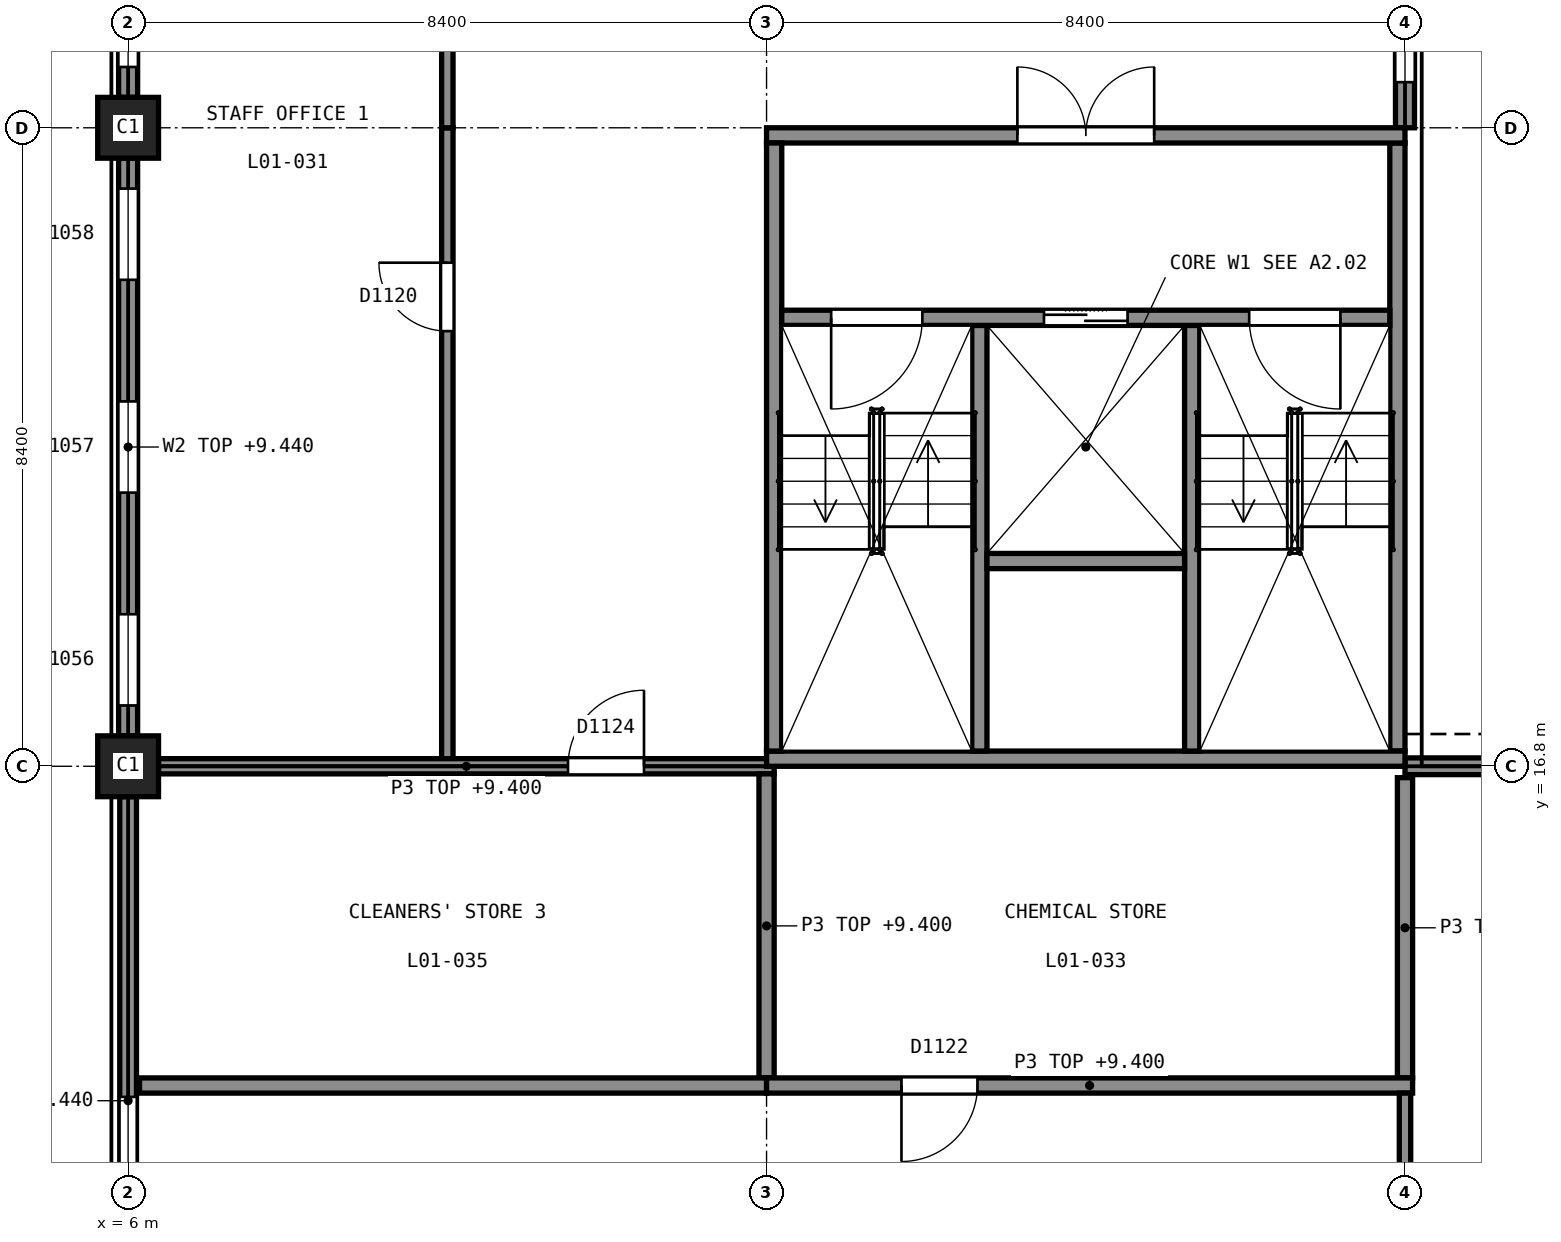
"""IFC4 building model, lengths in metres.
Left out: names, types, materials, properties, quantities, classifications, styles, units other than length and angle.
Written with IfcOpenShell. Run it as: python <this file> out.ifc"""

import sys

from ifc_helpers import new_model, si_unit, direction, frame, frame_2d, origin, origin_2d, place, context, subcontext, project, spatial, rectangle, extrude, element, fill, save


model = new_model("IFC4")
c1 = context("Model", 3, precision=1e-05, world=origin(), true_north=direction((0.0, 1.0)))
c2 = subcontext(c1, "Body", "Model", "MODEL_VIEW")
j1 = project(units=[si_unit("LENGTHUNIT", "METRE"), si_unit("PLANEANGLEUNIT", "RADIAN")], contexts=[c1])
p1 = place(None, origin())
s1 = spatial("IfcSite", under=j1, at=p1, CompositionType="ELEMENT")
p2 = place(p1, origin())
s2 = spatial("IfcBuilding", under=s1, at=p2, CompositionType="ELEMENT")
p3 = place(p2, frame((0.0, 0.0, 5.5)))
s3 = spatial("IfcBuildingStorey", under=s2, at=p3, CompositionType="ELEMENT", Elevation=5.5)
p4 = place(p3, frame((14.4, 16.9, 0.0), z_axis=(0.0, 0.0, 1.0), x_axis=(1.0, 0.0, 0.0)))
e1 = element("IfcWall", 1, at=p4, inside=s3, PredefinedType="SHEAR", context=c2, shape_type="SweptSolid", body=[
    extrude(rectangle(XDim=8.4, YDim=0.2, at=frame_2d((4.2, 0.0))), origin(), (0.0, 0.0, 1.0), 5.0),
])
p5 = place(p3, frame((14.4, 25.1, 0.0), z_axis=(0.0, 0.0, 1.0), x_axis=(1.0, 0.0, 0.0)))
e2 = element("IfcWall", 2, at=p5, inside=s3, PredefinedType="SHEAR", context=c2, shape_type="SweptSolid", body=[
    extrude(rectangle(XDim=8.4, YDim=0.2, at=frame_2d((4.2, 0.0))), origin(), (0.0, 0.0, 1.0), 5.0),
])
p6 = place(p5, frame((3.3, 0.0, 0.0)))
e3 = element("IfcOpeningElement", 3, at=p6, cuts=e2, PredefinedType="OPENING", context=c2, shape_type="SweptSolid", body=[
    extrude(rectangle(XDim=1.8, YDim=2.1, at=frame_2d((0.9, 1.05))), frame((0.0, 0.11, 0.0), z_axis=(0.0, -1.0, 0.0), x_axis=(1.0, 0.0, 0.0)), (0.0, 0.0, 1.0), 0.22),
])
for number, where, z_axis, x_axis in (
    (4, (14.5, 17.0, 0.0), (0.0, 0.0, 1.0), (0.0, 1.0, 0.0)),
    (5, (22.7, 17.0, 0.0), (0.0, 0.0, 1.0), (0.0, 1.0, 0.0)),
):
    element("IfcWall", number, at=place(p3, frame(where, z_axis=z_axis, x_axis=x_axis)), inside=s3, PredefinedType="SHEAR", context=c2, shape_type="SweptSolid", body=[
        extrude(rectangle(XDim=8.0, YDim=0.2, at=frame_2d((4.0, 0.0))), origin(), (0.0, 0.0, 1.0), 5.0),
    ])
p7 = place(p3, frame((14.6, 22.7, 0.0), z_axis=(0.0, 0.0, 1.0), x_axis=(1.0, 0.0, 0.0)))
e6 = element("IfcWall", 6, at=p7, inside=s3, PredefinedType="SHEAR", context=c2, shape_type="SweptSolid", body=[
    extrude(rectangle(XDim=8.0, YDim=0.2, at=frame_2d((4.0, 0.0))), origin(), (0.0, 0.0, 1.0), 5.0),
])
p8 = place(p7, frame((0.65, 0.0, 0.0)))
e7 = element("IfcOpeningElement", 7, at=p8, cuts=e6, PredefinedType="OPENING", context=c2, shape_type="SweptSolid", body=[
    extrude(rectangle(XDim=1.2, YDim=2.1, at=frame_2d((0.6, 1.05))), frame((0.0, 0.11, 0.0), z_axis=(0.0, -1.0, 0.0), x_axis=(1.0, 0.0, 0.0)), (0.0, 0.0, 1.0), 0.22),
])
p9 = place(p7, frame((6.15, 0.0, 0.0)))
e8 = element("IfcOpeningElement", 8, at=p9, cuts=e6, PredefinedType="OPENING", context=c2, shape_type="SweptSolid", body=[
    extrude(rectangle(XDim=1.2, YDim=2.1, at=frame_2d((0.6, 1.05))), frame((0.0, 0.11, 0.0), z_axis=(0.0, -1.0, 0.0), x_axis=(1.0, 0.0, 0.0)), (0.0, 0.0, 1.0), 0.22),
])
p10 = place(p7, frame((3.45, 0.0, 0.0)))
e9 = element("IfcOpeningElement", 9, at=p10, cuts=e6, PredefinedType="OPENING", context=c2, shape_type="SweptSolid", body=[
    extrude(rectangle(XDim=1.1, YDim=2.1, at=frame_2d((0.55, 1.05))), frame((0.0, 0.11, 0.0), z_axis=(0.0, -1.0, 0.0), x_axis=(1.0, 0.0, 0.0)), (0.0, 0.0, 1.0), 0.22),
])
for number, where, z_axis, x_axis in (
    (10, (17.2, 17.0, 0.0), (0.0, 0.0, 1.0), (0.0, 1.0, 0.0)),
    (11, (20.0, 17.0, 0.0), (0.0, 0.0, 1.0), (0.0, 1.0, 0.0)),
):
    element("IfcWall", number, at=place(p3, frame(where, z_axis=z_axis, x_axis=x_axis)), inside=s3, PredefinedType="SHEAR", context=c2, shape_type="SweptSolid", body=[
        extrude(rectangle(XDim=5.6, YDim=0.2, at=frame_2d((2.8, 0.0))), origin(), (0.0, 0.0, 1.0), 5.0),
    ])
p11 = place(p3, frame((17.3, 19.5, 0.0), z_axis=(0.0, 0.0, 1.0), x_axis=(1.0, 0.0, 0.0)))
e12 = element("IfcWall", 12, at=p11, inside=s3, PredefinedType="SHEAR", context=c2, shape_type="SweptSolid", body=[
    extrude(rectangle(XDim=2.6, YDim=0.2, at=frame_2d((1.3, 0.0))), origin(), (0.0, 0.0, 1.0), 5.0),
])
for number, where, z_axis, x_axis in (
    (13, (6.0, 16.8, 0.0), (0.0, 0.0, 1.0), (1.0, 0.0, 0.0)),
    (14, (6.0, 25.2, 0.0), (0.0, 0.0, 1.0), (1.0, 0.0, 0.0)),
):
    element("IfcColumn", number, at=place(p3, frame(where, z_axis=z_axis, x_axis=x_axis)), inside=s3, PredefinedType="COLUMN", context=c2, shape_type="SweptSolid", body=[
        extrude(rectangle(XDim=0.8, YDim=0.8, at=origin_2d()), origin(), (0.0, 0.0, 1.0), 5.0),
    ])
p12 = place(p3, frame((22.8, 16.8, 0.0), z_axis=(0.0, 0.0, 1.0), x_axis=(1.0, 0.0, 0.0)))
e15 = element("IfcWall", 15, at=p12, inside=s3, PredefinedType="SOLIDWALL", context=c2, shape_type="SweptSolid", body=[
    extrude(rectangle(XDim=8.0, YDim=0.22, at=frame_2d((4.0, 0.0))), origin(), (0.0, 0.0, 1.0), 3.94),
])
p13 = place(p12, frame((2.2, 0.0, 0.9)))
e16 = element("IfcOpeningElement", 16, at=p13, cuts=e15, PredefinedType="OPENING", context=c2, shape_type="SweptSolid", body=[
    extrude(rectangle(XDim=3.6, YDim=1.5, at=frame_2d((1.8, 0.75))), frame((0.0, 0.12, 0.0), z_axis=(0.0, -1.0, 0.0), x_axis=(1.0, 0.0, 0.0)), (0.0, 0.0, 1.0), 0.24),
])
p14 = place(p3, frame((22.8, 25.2, 0.0), z_axis=(0.0, 0.0, 1.0), x_axis=(0.0, 1.0, 0.0)))
e17 = element("IfcWall", 17, at=p14, inside=s3, PredefinedType="SOLIDWALL", context=c2, shape_type="SweptSolid", body=[
    extrude(rectangle(XDim=8.0, YDim=0.25, at=frame_2d((4.0, 0.0))), origin(), (0.0, 0.0, 1.0), 3.94),
])
p15 = place(p14, frame((0.6, 0.0, 0.9)))
e18 = element("IfcOpeningElement", 18, at=p15, cuts=e17, PredefinedType="OPENING", context=c2, shape_type="SweptSolid", body=[
    extrude(rectangle(XDim=1.2, YDim=2.1, at=frame_2d((0.6, 1.05))), frame((0.0, 0.135, 0.0), z_axis=(0.0, -1.0, 0.0), x_axis=(1.0, 0.0, 0.0)), (0.0, 0.0, 1.0), 0.27),
])
p16 = place(p14, frame((2.85, 0.0, 0.9)))
e19 = element("IfcOpeningElement", 19, at=p16, cuts=e17, PredefinedType="OPENING", context=c2, shape_type="SweptSolid", body=[
    extrude(rectangle(XDim=1.2, YDim=2.1, at=frame_2d((0.6, 1.05))), frame((0.0, 0.135, 0.0), z_axis=(0.0, -1.0, 0.0), x_axis=(1.0, 0.0, 0.0)), (0.0, 0.0, 1.0), 0.27),
])
p17 = place(p14, frame((6.2, 0.0, 0.9)))
e20 = element("IfcOpeningElement", 20, at=p17, cuts=e17, PredefinedType="OPENING", context=c2, shape_type="SweptSolid", body=[
    extrude(rectangle(XDim=1.2, YDim=2.1, at=frame_2d((0.6, 1.05))), frame((0.0, 0.135, 0.0), z_axis=(0.0, -1.0, 0.0), x_axis=(1.0, 0.0, 0.0)), (0.0, 0.0, 1.0), 0.27),
])
p18 = place(p3, frame((6.0, 25.6, 0.0), z_axis=(0.0, 0.0, 1.0), x_axis=(0.0, 1.0, 0.0)))
e21 = element("IfcWall", 21, at=p18, inside=s3, PredefinedType="SOLIDWALL", context=c2, shape_type="SweptSolid", body=[
    extrude(rectangle(XDim=7.6, YDim=0.25, at=frame_2d((3.8, 0.0))), origin(), (0.0, 0.0, 1.0), 3.94),
])
p19 = place(p18, frame((0.4, 0.0, 0.9)))
e22 = element("IfcOpeningElement", 22, at=p19, cuts=e21, PredefinedType="OPENING", context=c2, shape_type="SweptSolid", body=[
    extrude(rectangle(XDim=1.2, YDim=2.1, at=frame_2d((0.6, 1.05))), frame((0.0, 0.135, 0.0), z_axis=(0.0, -1.0, 0.0), x_axis=(1.0, 0.0, 0.0)), (0.0, 0.0, 1.0), 0.27),
])
p20 = place(p18, frame((3.2, 0.0, 0.9)))
e23 = element("IfcOpeningElement", 23, at=p20, cuts=e21, PredefinedType="OPENING", context=c2, shape_type="SweptSolid", body=[
    extrude(rectangle(XDim=1.2, YDim=2.1, at=frame_2d((0.6, 1.05))), frame((0.0, 0.135, 0.0), z_axis=(0.0, -1.0, 0.0), x_axis=(1.0, 0.0, 0.0)), (0.0, 0.0, 1.0), 0.27),
])
p21 = place(p18, frame((6.0, 0.0, 0.9)))
e24 = element("IfcOpeningElement", 24, at=p21, cuts=e21, PredefinedType="OPENING", context=c2, shape_type="SweptSolid", body=[
    extrude(rectangle(XDim=1.2, YDim=2.1, at=frame_2d((0.6, 1.05))), frame((0.0, 0.135, 0.0), z_axis=(0.0, -1.0, 0.0), x_axis=(1.0, 0.0, 0.0)), (0.0, 0.0, 1.0), 0.27),
])
p22 = place(p3, frame((6.0, 17.2, 0.0), z_axis=(0.0, 0.0, 1.0), x_axis=(0.0, 1.0, 0.0)))
e25 = element("IfcWall", 25, at=p22, inside=s3, PredefinedType="SOLIDWALL", context=c2, shape_type="SweptSolid", body=[
    extrude(rectangle(XDim=7.6, YDim=0.25, at=frame_2d((3.8, 0.0))), origin(), (0.0, 0.0, 1.0), 3.94),
])
p23 = place(p22, frame((0.4, 0.0, 0.9)))
e26 = element("IfcOpeningElement", 26, at=p23, cuts=e25, PredefinedType="OPENING", context=c2, shape_type="SweptSolid", body=[
    extrude(rectangle(XDim=1.2, YDim=2.1, at=frame_2d((0.6, 1.05))), frame((0.0, 0.135, 0.0), z_axis=(0.0, -1.0, 0.0), x_axis=(1.0, 0.0, 0.0)), (0.0, 0.0, 1.0), 0.27),
])
p24 = place(p22, frame((3.2, 0.0, 0.9)))
e27 = element("IfcOpeningElement", 27, at=p24, cuts=e25, PredefinedType="OPENING", context=c2, shape_type="SweptSolid", body=[
    extrude(rectangle(XDim=1.2, YDim=2.1, at=frame_2d((0.6, 1.05))), frame((0.0, 0.135, 0.0), z_axis=(0.0, -1.0, 0.0), x_axis=(1.0, 0.0, 0.0)), (0.0, 0.0, 1.0), 0.27),
])
p25 = place(p22, frame((6.0, 0.0, 0.9)))
e28 = element("IfcOpeningElement", 28, at=p25, cuts=e25, PredefinedType="OPENING", context=c2, shape_type="SweptSolid", body=[
    extrude(rectangle(XDim=1.2, YDim=2.1, at=frame_2d((0.6, 1.05))), frame((0.0, 0.135, 0.0), z_axis=(0.0, -1.0, 0.0), x_axis=(1.0, 0.0, 0.0)), (0.0, 0.0, 1.0), 0.27),
])
p26 = place(p3, frame((6.0, 8.4, 0.0), z_axis=(0.0, 0.0, 1.0), x_axis=(0.0, 1.0, 0.0)))
e29 = element("IfcWall", 29, at=p26, inside=s3, PredefinedType="SOLIDWALL", context=c2, shape_type="SweptSolid", body=[
    extrude(rectangle(XDim=8.0, YDim=0.22, at=frame_2d((4.0, 0.0))), origin(), (0.0, 0.0, 1.0), 3.94),
])
p27 = place(p26, frame((0.45, 0.0, 0.9)))
e30 = element("IfcOpeningElement", 30, at=p27, cuts=e29, PredefinedType="OPENING", context=c2, shape_type="SweptSolid", body=[
    extrude(rectangle(XDim=3.6, YDim=1.5, at=frame_2d((1.8, 0.75))), frame((0.0, 0.12, 0.0), z_axis=(0.0, -1.0, 0.0), x_axis=(1.0, 0.0, 0.0)), (0.0, 0.0, 1.0), 0.24),
])
p28 = place(p3, frame((10.2, 16.9, 0.0), z_axis=(0.0, 0.0, 1.0), x_axis=(0.0, 1.0, 0.0)))
e31 = element("IfcWall", 31, at=p28, inside=s3, PredefinedType="PARTITIONING", context=c2, shape_type="SweptSolid", body=[
    extrude(rectangle(XDim=8.3, YDim=0.15, at=frame_2d((4.15, 0.0))), origin(), (0.0, 0.0, 1.0), 3.9),
])
p29 = place(p28, frame((5.625, 0.0, 0.0)))
e32 = element("IfcOpeningElement", 32, at=p29, cuts=e31, PredefinedType="OPENING", context=c2, shape_type="SweptSolid", body=[
    extrude(rectangle(XDim=0.9, YDim=2.1, at=frame_2d((0.45, 1.05))), frame((0.0, 0.085, 0.0), z_axis=(0.0, -1.0, 0.0), x_axis=(1.0, 0.0, 0.0)), (0.0, 0.0, 1.0), 0.17),
])
p30 = place(p3, frame((10.2, 25.2, 0.0), z_axis=(0.0, 0.0, 1.0), x_axis=(0.0, 1.0, 0.0)))
e33 = element("IfcWall", 33, at=p30, inside=s3, PredefinedType="PARTITIONING", context=c2, shape_type="SweptSolid", body=[
    extrude(rectangle(XDim=8.325, YDim=0.15, at=frame_2d((4.163, 0.0))), origin(), (0.0, 0.0, 1.0), 3.9),
])
p31 = place(p3, frame((6.4, 16.8, 0.0), z_axis=(0.0, 0.0, 1.0), x_axis=(1.0, 0.0, 0.0)))
e34 = element("IfcWall", 34, at=p31, inside=s3, PredefinedType="PARTITIONING", context=c2, shape_type="SweptSolid", body=[
    extrude(rectangle(XDim=8.1, YDim=0.2, at=frame_2d((4.05, 0.0))), origin(), (0.0, 0.0, 1.0), 3.9),
])
p32 = place(p31, frame((5.387, 0.0, 0.0)))
e35 = element("IfcOpeningElement", 35, at=p32, cuts=e34, PredefinedType="OPENING", context=c2, shape_type="SweptSolid", body=[
    extrude(rectangle(XDim=1.0, YDim=2.1, at=frame_2d((0.5, 1.05))), frame((0.0, 0.11, 0.0), z_axis=(0.0, -1.0, 0.0), x_axis=(1.0, 0.0, 0.0)), (0.0, 0.0, 1.0), 0.22),
])
p33 = place(p3, frame((14.4, 12.7, 0.0), z_axis=(0.0, 0.0, 1.0), x_axis=(0.0, 1.0, 0.0)))
e36 = element("IfcWall", 36, at=p33, inside=s3, PredefinedType="PARTITIONING", context=c2, shape_type="SweptSolid", body=[
    extrude(rectangle(XDim=4.0, YDim=0.2, at=frame_2d((2.0, 0.0))), origin(), (0.0, 0.0, 1.0), 3.9),
])
p34 = place(p3, frame((22.8, 12.7, 0.0), z_axis=(0.0, 0.0, 1.0), x_axis=(0.0, 1.0, 0.0)))
e37 = element("IfcWall", 37, at=p34, inside=s3, PredefinedType="PARTITIONING", context=c2, shape_type="SweptSolid", body=[
    extrude(rectangle(XDim=3.95, YDim=0.2, at=frame_2d((1.975, 0.0))), origin(), (0.0, 0.0, 1.0), 3.9),
])
p35 = place(p3, frame((6.15, 12.6, 0.0), z_axis=(0.0, 0.0, 1.0), x_axis=(1.0, 0.0, 0.0)))
e38 = element("IfcWall", 38, at=p35, inside=s3, PredefinedType="PARTITIONING", context=c2, shape_type="SweptSolid", body=[
    extrude(rectangle(XDim=8.25, YDim=0.2, at=frame_2d((4.125, 0.0))), origin(), (0.0, 0.0, 1.0), 3.9),
])
p36 = place(p3, frame((14.4, 12.6, 0.0), z_axis=(0.0, 0.0, 1.0), x_axis=(1.0, 0.0, 0.0)))
e39 = element("IfcWall", 39, at=p36, inside=s3, PredefinedType="PARTITIONING", context=c2, shape_type="SweptSolid", body=[
    extrude(rectangle(XDim=8.5, YDim=0.2, at=frame_2d((4.25, 0.0))), origin(), (0.0, 0.0, 1.0), 3.9),
])
p37 = place(p36, frame((1.775, 0.0, 0.0)))
e40 = element("IfcOpeningElement", 40, at=p37, cuts=e39, PredefinedType="OPENING", context=c2, shape_type="SweptSolid", body=[
    extrude(rectangle(XDim=1.0, YDim=2.1, at=frame_2d((0.5, 1.05))), frame((0.0, 0.11, 0.0), z_axis=(0.0, -1.0, 0.0), x_axis=(1.0, 0.0, 0.0)), (0.0, 0.0, 1.0), 0.22),
])
p38 = place(p3, frame((22.8, 8.8, 0.0), z_axis=(0.0, 0.0, 1.0), x_axis=(0.0, 1.0, 0.0)))
e41 = element("IfcWall", 41, at=p38, inside=s3, PredefinedType="PARTITIONING", context=c2, shape_type="SweptSolid", body=[
    extrude(rectangle(XDim=3.7, YDim=0.15, at=frame_2d((1.85, 0.0))), origin(), (0.0, 0.0, 1.0), 3.9),
])
p39 = place(p15, origin())
e42 = element("IfcWindow", 42, at=p39, inside=s3, PartitioningType="SINGLE_PANEL", PredefinedType="WINDOW", context=c2, shape_type="SweptSolid", body=[
    extrude(rectangle(XDim=1.2, YDim=2.1, at=frame_2d((0.6, 1.05))), frame((0.0, 0.105, 0.0), z_axis=(0.0, -1.0, 0.0), x_axis=(1.0, 0.0, 0.0)), (0.0, 0.0, 1.0), 0.06),
])
fill(e18, e42)
p40 = place(p19, origin())
e43 = element("IfcWindow", 43, at=p40, inside=s3, PartitioningType="SINGLE_PANEL", PredefinedType="WINDOW", context=c2, shape_type="SweptSolid", body=[
    extrude(rectangle(XDim=1.2, YDim=2.1, at=frame_2d((0.6, 1.05))), frame((0.0, -0.045, 0.0), z_axis=(0.0, -1.0, 0.0), x_axis=(1.0, 0.0, 0.0)), (0.0, 0.0, 1.0), 0.06),
])
fill(e22, e43)
p41 = place(p23, origin())
e44 = element("IfcWindow", 44, at=p41, inside=s3, PartitioningType="SINGLE_PANEL", PredefinedType="WINDOW", context=c2, shape_type="SweptSolid", body=[
    extrude(rectangle(XDim=1.2, YDim=2.1, at=frame_2d((0.6, 1.05))), frame((0.0, -0.045, 0.0), z_axis=(0.0, -1.0, 0.0), x_axis=(1.0, 0.0, 0.0)), (0.0, 0.0, 1.0), 0.06),
])
fill(e26, e44)
p42 = place(p24, origin())
e45 = element("IfcWindow", 45, at=p42, inside=s3, PartitioningType="SINGLE_PANEL", PredefinedType="WINDOW", context=c2, shape_type="SweptSolid", body=[
    extrude(rectangle(XDim=1.2, YDim=2.1, at=frame_2d((0.6, 1.05))), frame((0.0, -0.045, 0.0), z_axis=(0.0, -1.0, 0.0), x_axis=(1.0, 0.0, 0.0)), (0.0, 0.0, 1.0), 0.06),
])
fill(e27, e45)
p43 = place(p25, origin())
e46 = element("IfcWindow", 46, at=p43, inside=s3, PartitioningType="SINGLE_PANEL", PredefinedType="WINDOW", context=c2, shape_type="SweptSolid", body=[
    extrude(rectangle(XDim=1.2, YDim=2.1, at=frame_2d((0.6, 1.05))), frame((0.0, -0.045, 0.0), z_axis=(0.0, -1.0, 0.0), x_axis=(1.0, 0.0, 0.0)), (0.0, 0.0, 1.0), 0.06),
])
fill(e28, e46)
p44 = place(p27, origin())
e47 = element("IfcWindow", 47, at=p44, inside=s3, PartitioningType="DOUBLE_PANEL_VERTICAL", PredefinedType="WINDOW", context=c2, shape_type="SweptSolid", body=[
    extrude(rectangle(XDim=3.6, YDim=1.5, at=frame_2d((1.8, 0.75))), frame((0.0, -0.03, 0.0), z_axis=(0.0, -1.0, 0.0), x_axis=(1.0, 0.0, 0.0)), (0.0, 0.0, 1.0), 0.06),
])
fill(e30, e47)
p45 = place(p29, origin())
e48 = element("IfcDoor", 48, at=p45, inside=s3, OperationType="SINGLE_SWING_LEFT", PredefinedType="DOOR", context=c2, shape_type="SweptSolid", body=[
    extrude(rectangle(XDim=0.9, YDim=2.1, at=frame_2d((0.45, 1.05))), frame((0.0, 0.025, 0.0), z_axis=(0.0, -1.0, 0.0), x_axis=(1.0, 0.0, 0.0)), (0.0, 0.0, 1.0), 0.05),
])
fill(e32, e48)
p46 = place(p37, origin())
e49 = element("IfcDoor", 49, at=p46, inside=s3, OperationType="SINGLE_SWING_LEFT", PredefinedType="DOOR", context=c2, shape_type="SweptSolid", body=[
    extrude(rectangle(XDim=1.0, YDim=2.1, at=frame_2d((0.5, 1.05))), frame((0.0, 0.025, 0.0), z_axis=(0.0, -1.0, 0.0), x_axis=(1.0, 0.0, 0.0)), (0.0, 0.0, 1.0), 0.05),
])
fill(e40, e49)
p47 = place(p32, origin())
e50 = element("IfcDoor", 50, at=p47, inside=s3, OperationType="SINGLE_SWING_LEFT", PredefinedType="DOOR", context=c2, shape_type="SweptSolid", body=[
    extrude(rectangle(XDim=1.0, YDim=2.1, at=frame_2d((0.5, 1.05))), frame((0.0, 0.025, 0.0), z_axis=(0.0, -1.0, 0.0), x_axis=(1.0, 0.0, 0.0)), (0.0, 0.0, 1.0), 0.05),
])
fill(e35, e50)
p48 = place(p6, origin())
e51 = element("IfcDoor", 51, at=p48, inside=s3, OperationType="DOUBLE_DOOR_SINGLE_SWING", PredefinedType="DOOR", context=c2, shape_type="SweptSolid", body=[
    extrude(rectangle(XDim=1.8, YDim=2.1, at=frame_2d((0.9, 1.05))), frame((0.0, 0.025, 0.0), z_axis=(0.0, -1.0, 0.0), x_axis=(1.0, 0.0, 0.0)), (0.0, 0.0, 1.0), 0.05),
])
fill(e3, e51)
p49 = place(p8, origin())
e52 = element("IfcDoor", 52, at=p49, inside=s3, OperationType="SINGLE_SWING_LEFT", PredefinedType="DOOR", context=c2, shape_type="SweptSolid", body=[
    extrude(rectangle(XDim=1.2, YDim=2.1, at=frame_2d((0.6, 1.05))), frame((0.0, 0.025, 0.0), z_axis=(0.0, -1.0, 0.0), x_axis=(1.0, 0.0, 0.0)), (0.0, 0.0, 1.0), 0.05),
])
fill(e7, e52)
p50 = place(p9, origin())
e53 = element("IfcDoor", 53, at=p50, inside=s3, OperationType="SINGLE_SWING_RIGHT", PredefinedType="DOOR", context=c2, shape_type="SweptSolid", body=[
    extrude(rectangle(XDim=1.2, YDim=2.1, at=frame_2d((0.6, 1.05))), frame((0.0, 0.025, 0.0), z_axis=(0.0, -1.0, 0.0), x_axis=(1.0, 0.0, 0.0)), (0.0, 0.0, 1.0), 0.05),
])
fill(e8, e53)
p51 = place(p10, origin())
e54 = element("IfcDoor", 54, at=p51, inside=s3, OperationType="DOUBLE_DOOR_SLIDING", PredefinedType="DOOR", context=c2, shape_type="SweptSolid", body=[
    extrude(rectangle(XDim=1.1, YDim=2.1, at=frame_2d((0.55, 1.05))), frame((0.0, 0.025, 0.0), z_axis=(0.0, -1.0, 0.0), x_axis=(1.0, 0.0, 0.0)), (0.0, 0.0, 1.0), 0.05),
])
fill(e9, e54)
save(model, sys.argv[1])
